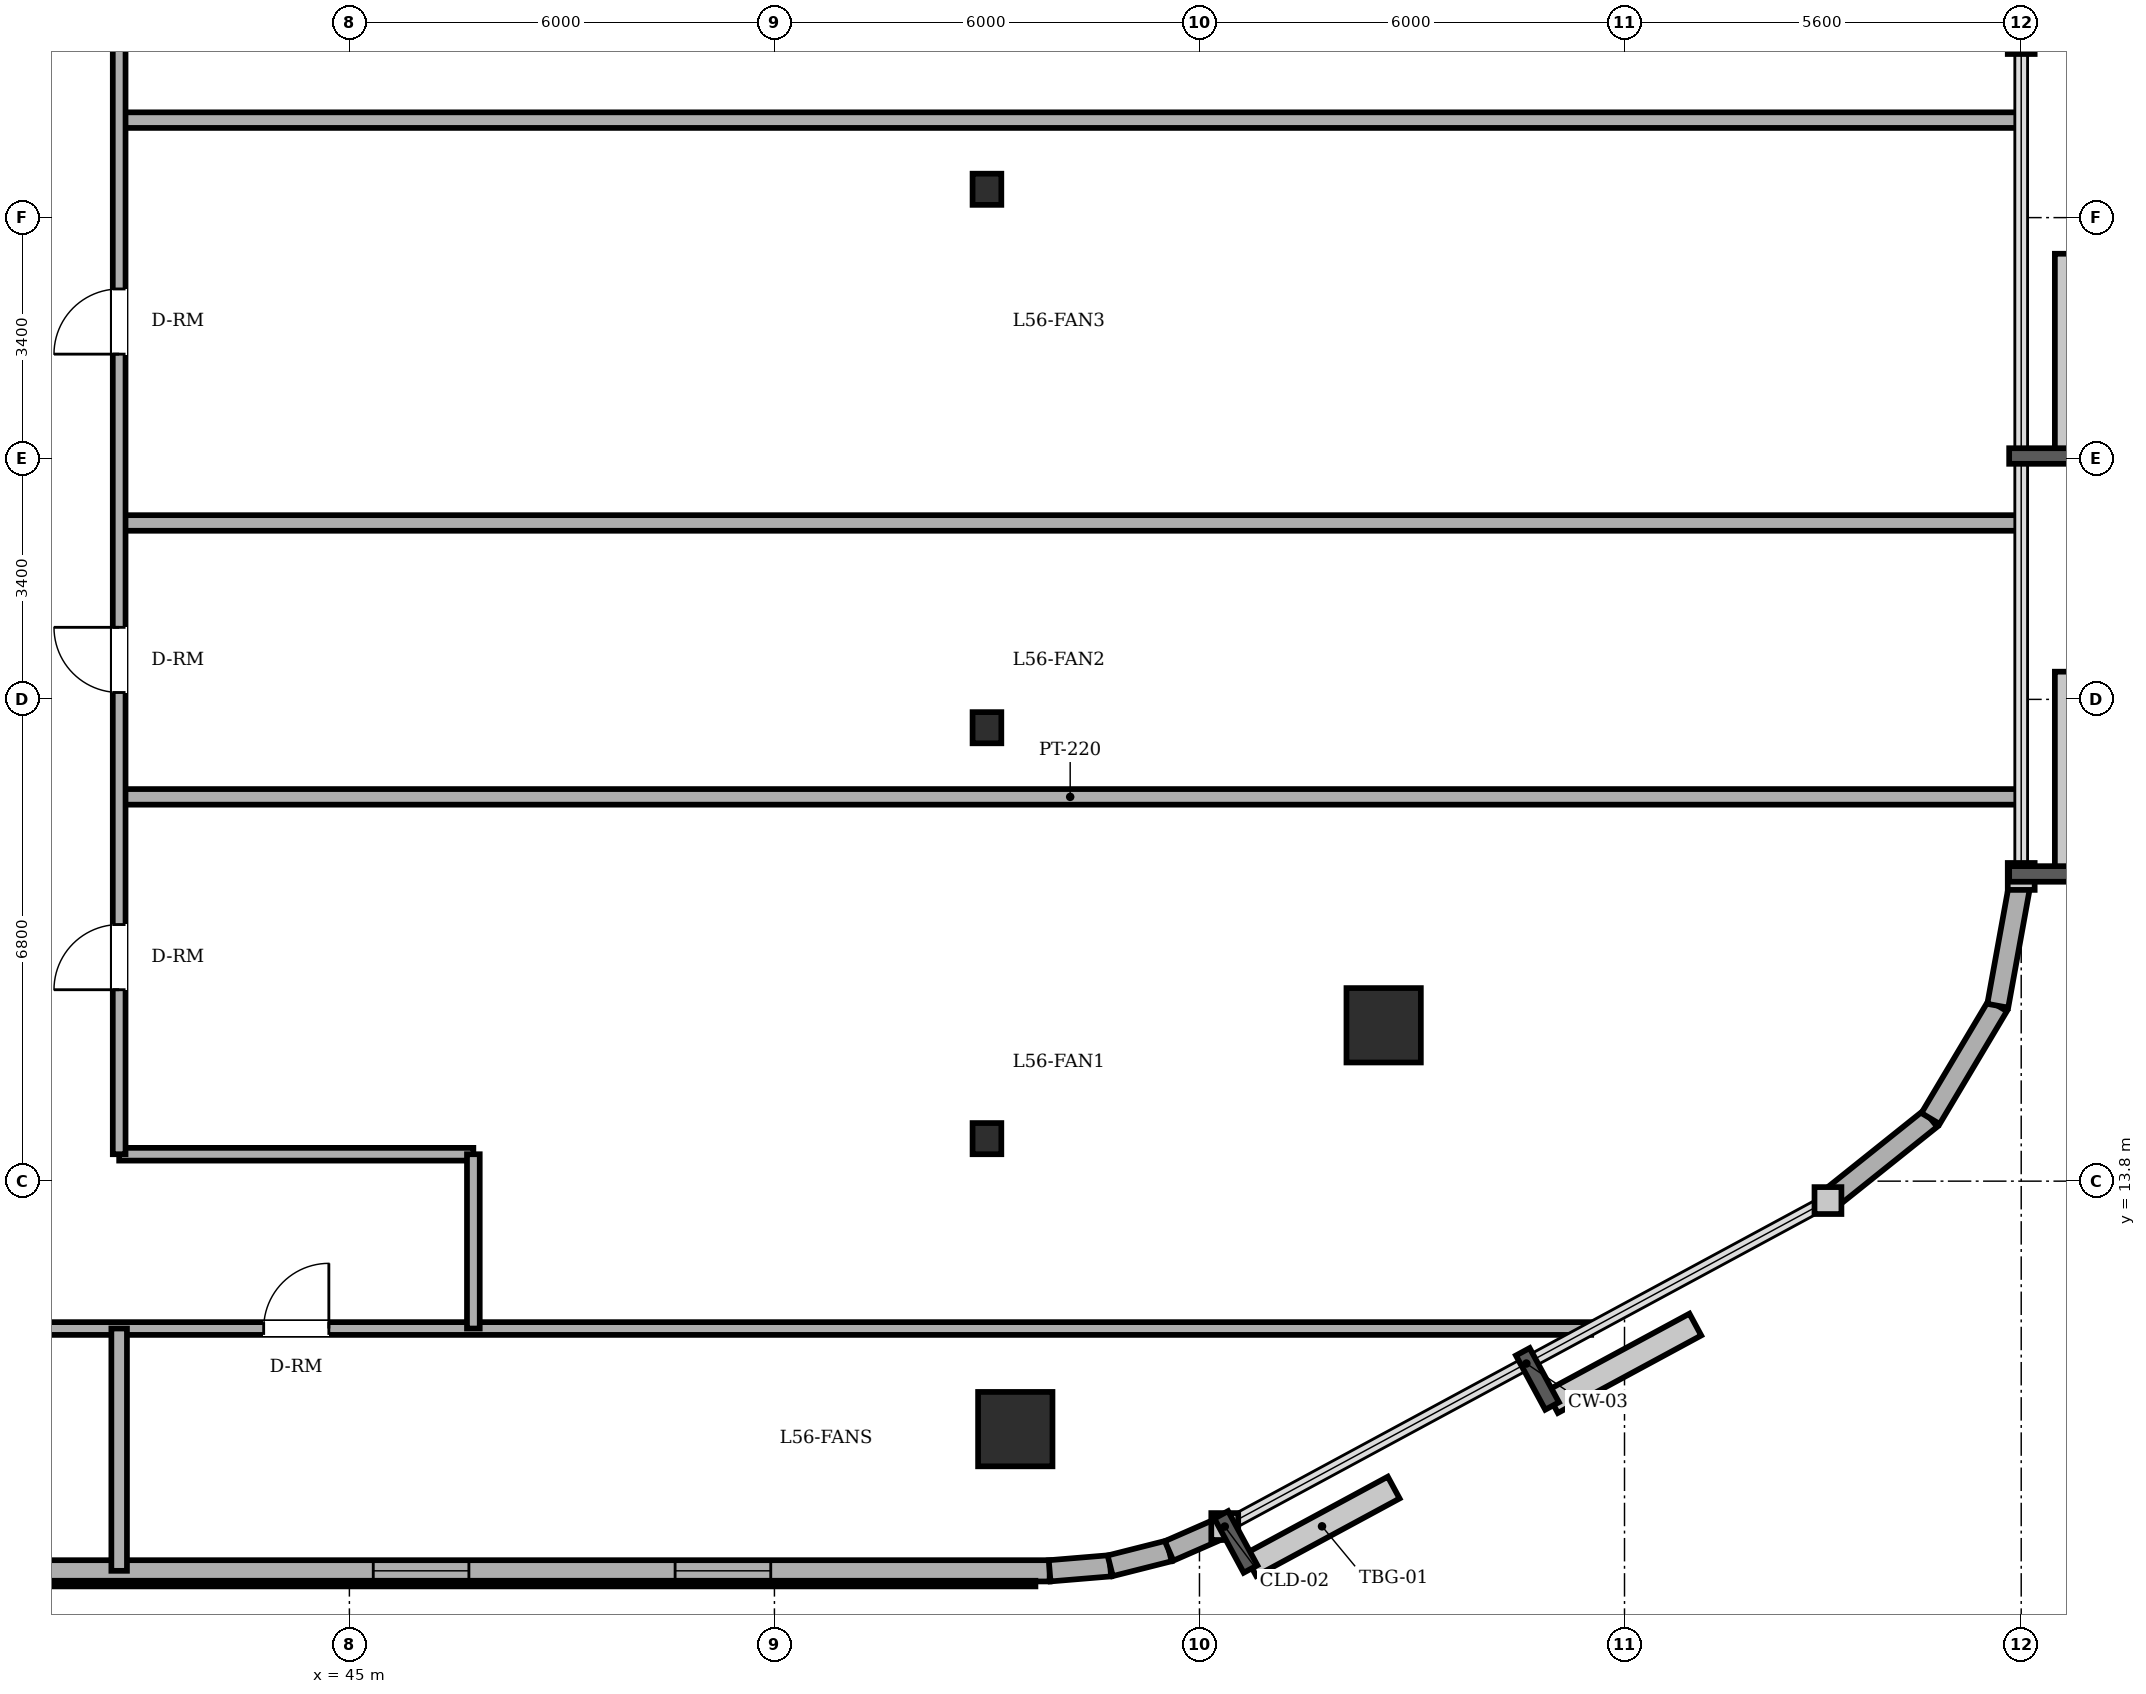
"""IFC4 building model, lengths in metres.
Left out: names, types, materials, properties, quantities, classifications, styles, units other than length and angle.
Written with IfcOpenShell. Run it as: python <this file> out.ifc"""

import sys

from ifc_helpers import new_model, si_unit, direction, frame, frame_2d, origin, origin_2d, place, context, subcontext, project, spatial, rectangle, circle, i_section, extrude, element, fill, save


model = new_model("IFC4")
c1 = context("Model", 3, precision=1e-05, world=origin(), true_north=direction((0.0, 1.0)))
c2 = subcontext(c1, "Body", "Model", "MODEL_VIEW")
j1 = project(units=[si_unit("LENGTHUNIT", "METRE"), si_unit("PLANEANGLEUNIT", "RADIAN")], contexts=[c1])
p1 = place(None, origin())
s1 = spatial("IfcSite", under=j1, at=p1, CompositionType="ELEMENT")
p2 = place(p1, origin())
s2 = spatial("IfcBuilding", under=s1, at=p2, CompositionType="ELEMENT")
p3 = place(p2, frame((0.0, 0.0, 215.7)))
s3 = spatial("IfcBuildingStorey", under=s2, at=p3, CompositionType="ELEMENT", Elevation=215.7)
for number, where, z_axis, x_axis in (
    (1, (54.4, 10.3, 0.0), (0.0, 0.0, 1.0), (1.0, 0.0, 0.0)),
    (2, (59.6, 16.0, 0.0), (0.0, 0.0, 1.0), (1.0, 0.0, 0.0)),
):
    element("IfcColumn", number, at=place(p3, frame(where, z_axis=z_axis, x_axis=x_axis)), inside=s3, PredefinedType="COLUMN", context=c2, shape_type="SweptSolid", body=[
        extrude(circle(Radius=0.525, at=origin_2d()), origin(), (0.0, 0.0, 1.0), 3.6),
    ])
for number, where, z_axis, x_axis in (
    (3, (54.0, 14.4, 0.0), (0.0, 0.0, 1.0), (1.0, 0.0, 0.0)),
    (4, (54.0, 20.2, 0.0), (0.0, 0.0, 1.0), (1.0, 0.0, 0.0)),
    (5, (54.0, 27.8, 0.0), (0.0, 0.0, 1.0), (1.0, 0.0, 0.0)),
):
    element("IfcColumn", number, at=place(p3, frame(where, z_axis=z_axis, x_axis=x_axis)), inside=s3, PredefinedType="COLUMN", context=c2, shape_type="SweptSolid", body=[
        extrude(i_section(OverallWidth=0.406, OverallDepth=0.44, WebThickness=0.024, FlangeThickness=0.039, FilletRadius=0.015, at=origin_2d()), origin(), (0.0, 0.0, 1.0), 3.6),
    ])
p4 = place(p3, frame((22.4, 8.3, 0.0), z_axis=(0.0, 0.0, 1.0), x_axis=(1.0, 0.0, 0.0)))
e6 = element("IfcWall", 6, at=p4, inside=s3, PredefinedType="SOLIDWALL", context=c2, shape_type="SweptSolid", body=[
    extrude(rectangle(XDim=32.485, YDim=0.3, at=frame_2d((16.243, 0.0))), origin(), (0.0, 0.0, 1.0), 3.4),
])
p5 = place(p4, frame((4.525, 0.0, 0.0)))
e7 = element("IfcOpeningElement", 7, at=p5, cuts=e6, PredefinedType="OPENING", context=c2, shape_type="SweptSolid", body=[
    extrude(rectangle(XDim=0.95, YDim=2.2, at=frame_2d((0.475, 1.1))), frame((0.0, 0.16, 0.0), z_axis=(0.0, -1.0, 0.0), x_axis=(1.0, 0.0, 0.0)), (0.0, 0.0, 1.0), 0.32),
])
p6 = place(p4, frame((1.3, 0.0, 0.85)))
e8 = element("IfcOpeningElement", 8, at=p6, cuts=e6, PredefinedType="OPENING", context=c2, shape_type="SweptSolid", body=[
    extrude(rectangle(XDim=1.35, YDim=1.55, at=frame_2d((0.675, 0.775))), frame((0.0, 0.16, 0.0), z_axis=(0.0, -1.0, 0.0), x_axis=(1.0, 0.0, 0.0)), (0.0, 0.0, 1.0), 0.32),
])
p7 = place(p4, frame((10.708, 0.0, 0.85)))
e9 = element("IfcOpeningElement", 9, at=p7, cuts=e6, PredefinedType="OPENING", context=c2, shape_type="SweptSolid", body=[
    extrude(rectangle(XDim=1.35, YDim=1.55, at=frame_2d((0.675, 0.775))), frame((0.0, 0.16, 0.0), z_axis=(0.0, -1.0, 0.0), x_axis=(1.0, 0.0, 0.0)), (0.0, 0.0, 1.0), 0.32),
])
p8 = place(p4, frame((14.692, 0.0, 0.85)))
e10 = element("IfcOpeningElement", 10, at=p8, cuts=e6, PredefinedType="OPENING", context=c2, shape_type="SweptSolid", body=[
    extrude(rectangle(XDim=1.35, YDim=1.55, at=frame_2d((0.675, 0.775))), frame((0.0, 0.16, 0.0), z_axis=(0.0, -1.0, 0.0), x_axis=(1.0, 0.0, 0.0)), (0.0, 0.0, 1.0), 0.32),
])
p9 = place(p4, frame((22.937, 0.0, 0.85)))
e11 = element("IfcOpeningElement", 11, at=p9, cuts=e6, PredefinedType="OPENING", context=c2, shape_type="SweptSolid", body=[
    extrude(rectangle(XDim=1.35, YDim=1.55, at=frame_2d((0.675, 0.775))), frame((0.0, 0.16, 0.0), z_axis=(0.0, -1.0, 0.0), x_axis=(1.0, 0.0, 0.0)), (0.0, 0.0, 1.0), 0.32),
])
p10 = place(p4, frame((27.198, 0.0, 0.85)))
e12 = element("IfcOpeningElement", 12, at=p10, cuts=e6, PredefinedType="OPENING", context=c2, shape_type="SweptSolid", body=[
    extrude(rectangle(XDim=1.35, YDim=1.55, at=frame_2d((0.675, 0.775))), frame((0.0, 0.16, 0.0), z_axis=(0.0, -1.0, 0.0), x_axis=(1.0, 0.0, 0.0)), (0.0, 0.0, 1.0), 0.32),
])
p11 = place(p3, frame((54.885, 8.3, 0.0), z_axis=(0.0, 0.0, 1.0), x_axis=(0.996565355958, 0.082809971041, 0.0)))
e13 = element("IfcWall", 13, at=p11, inside=s3, PredefinedType="SOLIDWALL", context=c2, shape_type="SweptSolid", body=[
    extrude(rectangle(XDim=0.858, YDim=0.3, at=frame_2d((0.429, 0.0))), origin(), (0.0, 0.0, 1.0), 3.4),
])
p12 = place(p3, frame((55.74, 8.371, 0.0), z_axis=(0.0, 0.0, 1.0), x_axis=(0.969536346338, 0.244947490555, 0.0)))
e14 = element("IfcWall", 14, at=p12, inside=s3, PredefinedType="SOLIDWALL", context=c2, shape_type="SweptSolid", body=[
    extrude(rectangle(XDim=0.857, YDim=0.3, at=frame_2d((0.429, 0.0))), origin(), (0.0, 0.0, 1.0), 3.4),
])
p13 = place(p3, frame((56.571, 8.581, 0.0), z_axis=(0.0, 0.0, 1.0), x_axis=(0.916085473636, 0.400983048261, 0.0)))
e15 = element("IfcWall", 15, at=p13, inside=s3, PredefinedType="SOLIDWALL", context=c2, shape_type="SweptSolid", body=[
    extrude(rectangle(XDim=0.858, YDim=0.3, at=frame_2d((0.429, 0.0))), origin(), (0.0, 0.0, 1.0), 3.4),
])
p14 = place(p3, frame((65.872, 13.526, 0.0), z_axis=(0.0, 0.0, 1.0), x_axis=(0.780920189257, 0.624630817372, 0.0)))
e16 = element("IfcWall", 16, at=p14, inside=s3, PredefinedType="SOLIDWALL", context=c2, shape_type="SweptSolid", body=[
    extrude(rectangle(XDim=1.854, YDim=0.3, at=frame_2d((0.927, 0.0))), origin(), (0.0, 0.0, 1.0), 3.4),
])
p15 = place(p3, frame((67.32, 14.684, 0.0), z_axis=(0.0, 0.0, 1.0), x_axis=(0.512072018927, 0.858942516955, 0.0)))
e17 = element("IfcWall", 17, at=p15, inside=s3, PredefinedType="SOLIDWALL", context=c2, shape_type="SweptSolid", body=[
    extrude(rectangle(XDim=1.853, YDim=0.3, at=frame_2d((0.927, 0.0))), origin(), (0.0, 0.0, 1.0), 3.4),
])
p16 = place(p3, frame((68.269, 16.276, 0.0), z_axis=(0.0, 0.0, 1.0), x_axis=(0.178468469252, 0.983945631365, 0.0)))
e18 = element("IfcWall", 18, at=p16, inside=s3, PredefinedType="SOLIDWALL", context=c2, shape_type="SweptSolid", body=[
    extrude(rectangle(XDim=1.855, YDim=0.3, at=frame_2d((0.927, 0.0))), origin(), (0.0, 0.0, 1.0), 3.4),
])
p17 = place(p3, frame((17.677, 11.72, 0.0), z_axis=(0.0, 0.0, 1.0), x_axis=(1.0, 0.0, 0.0)))
e19 = element("IfcWall", 19, at=p17, inside=s3, PredefinedType="PARTITIONING", context=c2, shape_type="SweptSolid", body=[
    extrude(rectangle(XDim=44.853, YDim=0.18, at=frame_2d((22.427, 0.0))), origin(), (0.0, 0.0, 1.0), 3.4),
])
p18 = place(p17, frame((9.763, 0.0, 0.0)))
e20 = element("IfcOpeningElement", 20, at=p18, cuts=e19, PredefinedType="OPENING", context=c2, shape_type="SweptSolid", body=[
    extrude(rectangle(XDim=0.92, YDim=2.1, at=frame_2d((0.46, 1.05))), frame((0.0, 0.1, 0.0), z_axis=(0.0, -1.0, 0.0), x_axis=(1.0, 0.0, 0.0)), (0.0, 0.0, 1.0), 0.2),
])
p19 = place(p17, frame((26.113, 0.0, 0.0)))
e21 = element("IfcOpeningElement", 21, at=p19, cuts=e19, PredefinedType="OPENING", context=c2, shape_type="SweptSolid", body=[
    extrude(rectangle(XDim=0.92, YDim=2.1, at=frame_2d((0.46, 1.05))), frame((0.0, 0.1, 0.0), z_axis=(0.0, -1.0, 0.0), x_axis=(1.0, 0.0, 0.0)), (0.0, 0.0, 1.0), 0.2),
])
p20 = place(p17, frame((4.063, 0.0, 0.0)))
e22 = element("IfcOpeningElement", 22, at=p20, cuts=e19, PredefinedType="OPENING", context=c2, shape_type="SweptSolid", body=[
    extrude(rectangle(XDim=0.92, YDim=2.1, at=frame_2d((0.46, 1.05))), frame((0.0, 0.1, 0.0), z_axis=(0.0, -1.0, 0.0), x_axis=(1.0, 0.0, 0.0)), (0.0, 0.0, 1.0), 0.2),
])
p21 = place(p17, frame((17.638, 0.0, 0.0)))
e23 = element("IfcOpeningElement", 23, at=p21, cuts=e19, PredefinedType="OPENING", context=c2, shape_type="SweptSolid", body=[
    extrude(rectangle(XDim=0.92, YDim=2.1, at=frame_2d((0.46, 1.05))), frame((0.0, 0.1, 0.0), z_axis=(0.0, -1.0, 0.0), x_axis=(1.0, 0.0, 0.0)), (0.0, 0.0, 1.0), 0.2),
])
p22 = place(p3, frame((41.75, 14.18, 0.0), z_axis=(0.0, 0.0, 1.0), x_axis=(1.0, 0.0, 0.0)))
e24 = element("IfcWall", 24, at=p22, inside=s3, PredefinedType="PARTITIONING", context=c2, shape_type="SweptSolid", body=[
    extrude(rectangle(XDim=5.0, YDim=0.18, at=frame_2d((2.5, 0.0))), origin(), (0.0, 0.0, 1.0), 2.982),
])
for number, where, z_axis, x_axis in (
    (25, (41.75, 19.224, 0.0), (0.0, 0.0, 1.0), (1.0, 0.0, 0.0)),
    (26, (41.75, 23.09, 0.0), (0.0, 0.0, 1.0), (1.0, 0.0, 0.0)),
    (27, (41.75, 28.776, 0.0), (0.0, 0.0, 1.0), (1.0, 0.0, 0.0)),
):
    element("IfcWall", number, at=place(p3, frame(where, z_axis=z_axis, x_axis=x_axis)), inside=s3, PredefinedType="PARTITIONING", context=c2, shape_type="SweptSolid", body=[
        extrude(rectangle(XDim=26.85, YDim=0.22, at=frame_2d((13.425, 0.0))), origin(), (0.0, 0.0, 1.0), 3.4),
    ])
p23 = place(p3, frame((41.75, 8.3, 0.0), z_axis=(0.0, 0.0, 1.0), x_axis=(0.0, 1.0, 0.0)))
e28 = element("IfcWall", 28, at=p23, inside=s3, PredefinedType="PARTITIONING", context=c2, shape_type="SweptSolid", body=[
    extrude(rectangle(XDim=3.42, YDim=0.22, at=frame_2d((1.71, 0.0))), origin(), (0.0, 0.0, 1.0), 3.4),
])
p24 = place(p3, frame((41.75, 14.18, 0.0), z_axis=(0.0, 0.0, 1.0), x_axis=(0.0, 1.0, 0.0)))
e29 = element("IfcWall", 29, at=p24, inside=s3, PredefinedType="PARTITIONING", context=c2, shape_type="SweptSolid", body=[
    extrude(rectangle(XDim=19.64, YDim=0.18, at=frame_2d((9.82, 0.0))), origin(), (0.0, 0.0, 1.0), 3.4),
])
p25 = place(p24, frame((2.322, 0.0, 0.0)))
e30 = element("IfcOpeningElement", 30, at=p25, cuts=e29, PredefinedType="OPENING", context=c2, shape_type="SweptSolid", body=[
    extrude(rectangle(XDim=0.92, YDim=2.1, at=frame_2d((0.46, 1.05))), frame((0.0, 0.1, 0.0), z_axis=(0.0, -1.0, 0.0), x_axis=(1.0, 0.0, 0.0)), (0.0, 0.0, 1.0), 0.2),
])
p26 = place(p24, frame((6.517, 0.0, 0.0)))
e31 = element("IfcOpeningElement", 31, at=p26, cuts=e29, PredefinedType="OPENING", context=c2, shape_type="SweptSolid", body=[
    extrude(rectangle(XDim=0.92, YDim=2.1, at=frame_2d((0.46, 1.05))), frame((0.0, 0.1, 0.0), z_axis=(0.0, -1.0, 0.0), x_axis=(1.0, 0.0, 0.0)), (0.0, 0.0, 1.0), 0.2),
])
p27 = place(p24, frame((11.293, 0.0, 0.0)))
e32 = element("IfcOpeningElement", 32, at=p27, cuts=e29, PredefinedType="OPENING", context=c2, shape_type="SweptSolid", body=[
    extrude(rectangle(XDim=0.92, YDim=2.1, at=frame_2d((0.46, 1.05))), frame((0.0, 0.1, 0.0), z_axis=(0.0, -1.0, 0.0), x_axis=(1.0, 0.0, 0.0)), (0.0, 0.0, 1.0), 0.2),
])
p28 = place(p24, frame((16.358, 0.0, 0.0)))
e33 = element("IfcOpeningElement", 33, at=p28, cuts=e29, PredefinedType="OPENING", context=c2, shape_type="SweptSolid", body=[
    extrude(rectangle(XDim=1.0, YDim=2.15, at=frame_2d((0.5, 1.075))), frame((0.0, 0.1, 0.0), z_axis=(0.0, -1.0, 0.0), x_axis=(1.0, 0.0, 0.0)), (0.0, 0.0, 1.0), 0.2),
])
p29 = place(p3, frame((46.75, 11.72, 0.0), z_axis=(0.0, 0.0, 1.0), x_axis=(0.0, 1.0, 0.0)))
e34 = element("IfcWall", 34, at=p29, inside=s3, PredefinedType="PARTITIONING", context=c2, shape_type="SweptSolid", body=[
    extrude(rectangle(XDim=2.46, YDim=0.18, at=frame_2d((1.23, 0.0))), origin(), (0.0, 0.0, 1.0), 3.4),
])
p30 = place(p9, origin())
e35 = element("IfcWindow", 35, at=p30, inside=s3, PartitioningType="SINGLE_PANEL", PredefinedType="WINDOW", context=c2, shape_type="SweptSolid", body=[
    extrude(rectangle(XDim=1.35, YDim=1.55, at=frame_2d((0.675, 0.775))), frame((0.0, 0.03, 0.0), z_axis=(0.0, -1.0, 0.0), x_axis=(1.0, 0.0, 0.0)), (0.0, 0.0, 1.0), 0.06),
])
fill(e11, e35)
p31 = place(p10, origin())
e36 = element("IfcWindow", 36, at=p31, inside=s3, PartitioningType="SINGLE_PANEL", PredefinedType="WINDOW", context=c2, shape_type="SweptSolid", body=[
    extrude(rectangle(XDim=1.35, YDim=1.55, at=frame_2d((0.675, 0.775))), frame((0.0, 0.03, 0.0), z_axis=(0.0, -1.0, 0.0), x_axis=(1.0, 0.0, 0.0)), (0.0, 0.0, 1.0), 0.06),
])
fill(e12, e36)
p32 = place(p25, origin())
e37 = element("IfcDoor", 37, at=p32, inside=s3, OperationType="SINGLE_SWING_LEFT", PredefinedType="DOOR", context=c2, shape_type="SweptSolid", body=[
    extrude(rectangle(XDim=0.92, YDim=2.1, at=frame_2d((0.46, 1.05))), frame((0.0, 0.025, 0.0), z_axis=(0.0, -1.0, 0.0), x_axis=(1.0, 0.0, 0.0)), (0.0, 0.0, 1.0), 0.05),
])
fill(e30, e37)
p33 = place(p26, origin())
e38 = element("IfcDoor", 38, at=p33, inside=s3, OperationType="SINGLE_SWING_RIGHT", PredefinedType="DOOR", context=c2, shape_type="SweptSolid", body=[
    extrude(rectangle(XDim=0.92, YDim=2.1, at=frame_2d((0.46, 1.05))), frame((0.0, 0.025, 0.0), z_axis=(0.0, -1.0, 0.0), x_axis=(1.0, 0.0, 0.0)), (0.0, 0.0, 1.0), 0.05),
])
fill(e31, e38)
p34 = place(p27, origin())
e39 = element("IfcDoor", 39, at=p34, inside=s3, OperationType="SINGLE_SWING_LEFT", PredefinedType="DOOR", context=c2, shape_type="SweptSolid", body=[
    extrude(rectangle(XDim=0.92, YDim=2.1, at=frame_2d((0.46, 1.05))), frame((0.0, 0.025, 0.0), z_axis=(0.0, -1.0, 0.0), x_axis=(1.0, 0.0, 0.0)), (0.0, 0.0, 1.0), 0.05),
])
fill(e32, e39)
p35 = place(p19, origin())
e40 = element("IfcDoor", 40, at=p35, inside=s3, OperationType="SINGLE_SWING_RIGHT", PredefinedType="DOOR", context=c2, shape_type="SweptSolid", body=[
    extrude(rectangle(XDim=0.92, YDim=2.1, at=frame_2d((0.46, 1.05))), frame((0.0, 0.025, 0.0), z_axis=(0.0, -1.0, 0.0), x_axis=(1.0, 0.0, 0.0)), (0.0, 0.0, 1.0), 0.05),
])
fill(e21, e40)
save(model, sys.argv[1])
